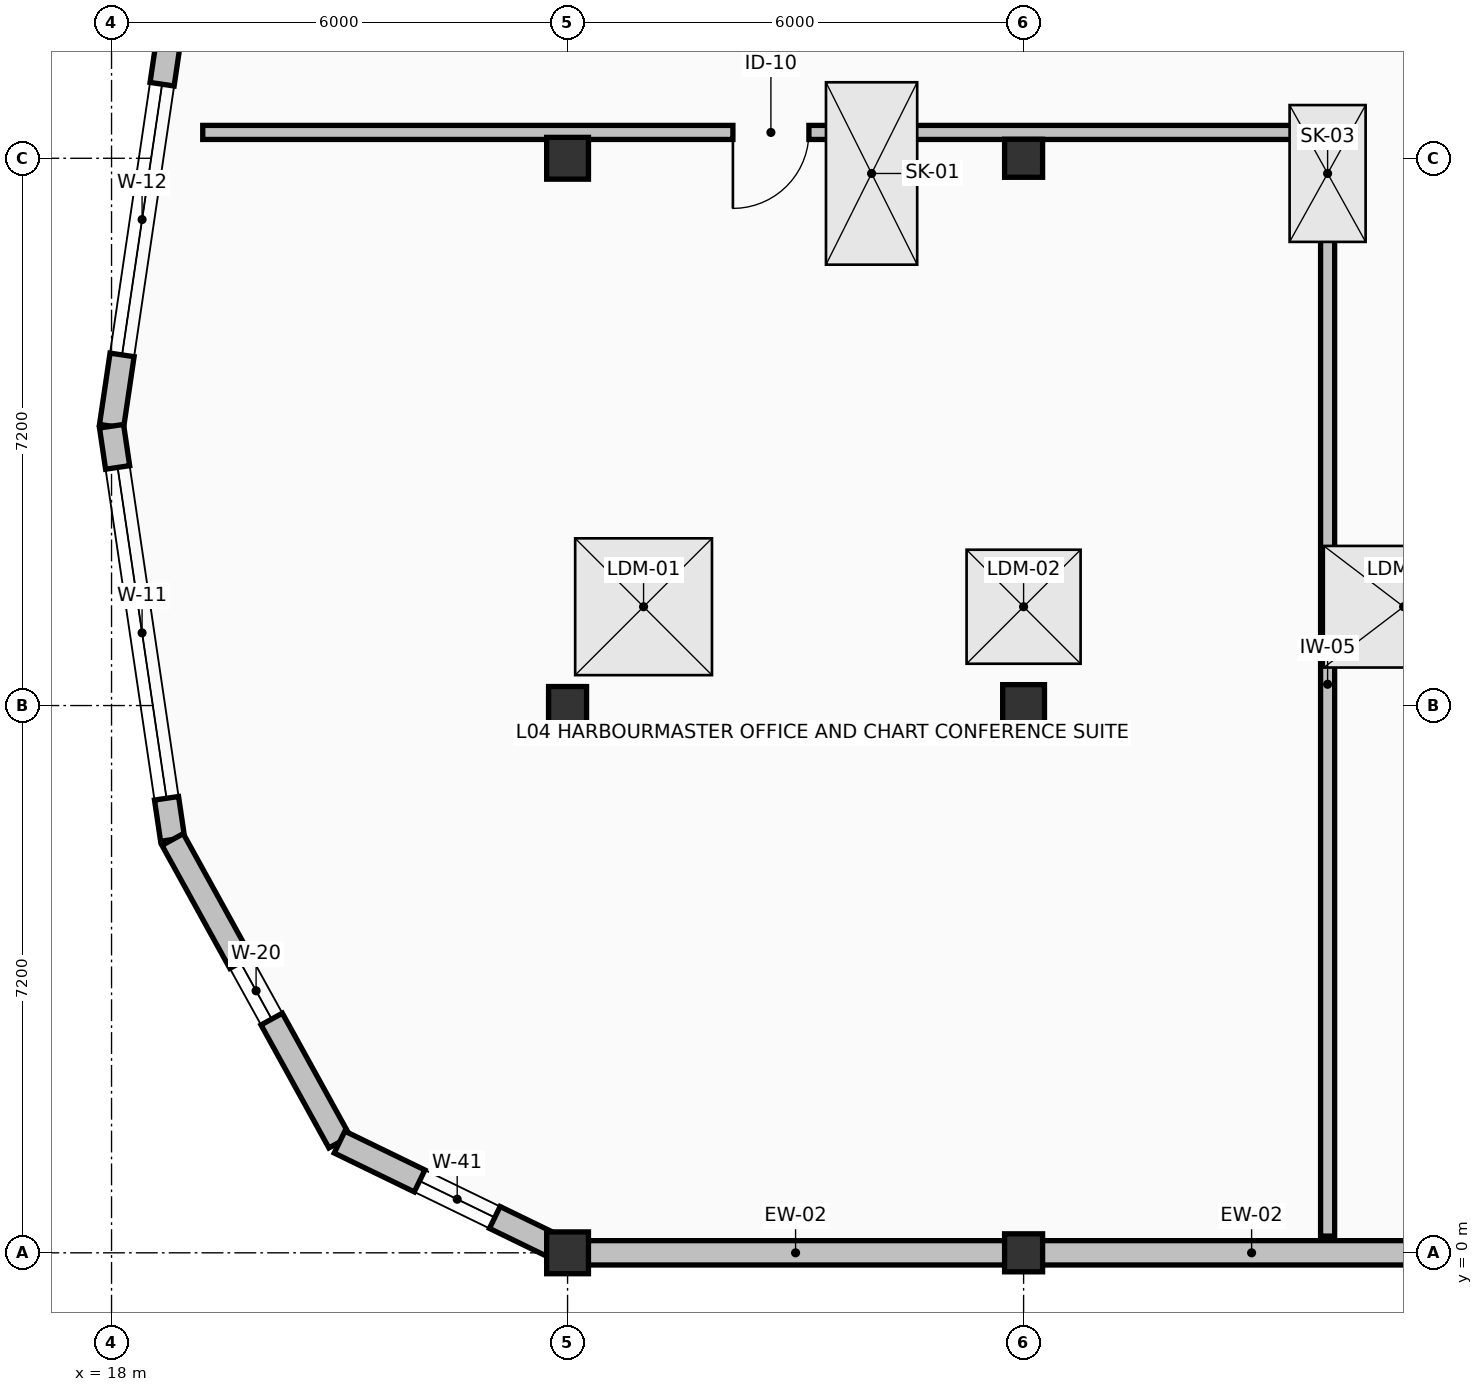
"""IFC4 building model, lengths in metres.
Left out: names, types, materials, properties, quantities, classifications, styles, units other than length and angle.
Written with IfcOpenShell. Run it as: python <this file> out.ifc"""

import sys

from ifc_helpers import new_model, si_unit, direction, frame, frame_2d, origin, origin_2d, place, context, subcontext, project, spatial, rectangle, extrude, element, fill, save


model = new_model("IFC4")
c1 = context("Model", 3, precision=1e-05, world=origin(), true_north=direction((0.0, 1.0)))
c2 = subcontext(c1, "Body", "Model", "MODEL_VIEW")
j1 = project(units=[si_unit("LENGTHUNIT", "METRE"), si_unit("PLANEANGLEUNIT", "RADIAN")], contexts=[c1])
p1 = place(None, origin())
s1 = spatial("IfcSite", under=j1, at=p1, CompositionType="ELEMENT")
p2 = place(p1, origin())
s2 = spatial("IfcBuilding", under=s1, at=p2, CompositionType="ELEMENT")
p3 = place(p2, frame((0.0, 0.0, 17.32)))
s3 = spatial("IfcBuildingStorey", under=s2, at=p3, CompositionType="ELEMENT", Elevation=17.32)
p4 = place(p3, frame((24.0, 0.0, 0.0), z_axis=(0.0, 0.0, 1.0), x_axis=(1.0, 0.0, 0.0)))
e1 = element("IfcColumn", 1, at=p4, inside=s3, PredefinedType="COLUMN", context=c2, shape_type="SweptSolid", body=[
    extrude(rectangle(XDim=0.55, YDim=0.55, at=origin_2d()), origin(), (0.0, 0.0, 1.0), 3.74),
])
p5 = place(p3, frame((24.0, 7.2, 0.0), z_axis=(0.0, 0.0, 1.0), x_axis=(1.0, 0.0, 0.0)))
e2 = element("IfcColumn", 2, at=p5, inside=s3, PredefinedType="COLUMN", context=c2, shape_type="SweptSolid", body=[
    extrude(rectangle(XDim=0.5, YDim=0.5, at=origin_2d()), origin(), (0.0, 0.0, 1.0), 3.74),
])
p6 = place(p3, frame((24.0, 14.4, 0.0), z_axis=(0.0, 0.0, 1.0), x_axis=(1.0, 0.0, 0.0)))
e3 = element("IfcColumn", 3, at=p6, inside=s3, PredefinedType="COLUMN", context=c2, shape_type="SweptSolid", body=[
    extrude(rectangle(XDim=0.55, YDim=0.55, at=origin_2d()), origin(), (0.0, 0.0, 1.0), 3.74),
])
p7 = place(p3, frame((30.0, 0.0, 0.0), z_axis=(0.0, 0.0, 1.0), x_axis=(1.0, 0.0, 0.0)))
e4 = element("IfcColumn", 4, at=p7, inside=s3, PredefinedType="COLUMN", context=c2, shape_type="SweptSolid", body=[
    extrude(rectangle(XDim=0.5, YDim=0.5, at=origin_2d()), origin(), (0.0, 0.0, 1.0), 3.74),
])
p8 = place(p3, frame((30.0, 7.2, 0.0), z_axis=(0.0, 0.0, 1.0), x_axis=(1.0, 0.0, 0.0)))
e5 = element("IfcColumn", 5, at=p8, inside=s3, PredefinedType="COLUMN", context=c2, shape_type="SweptSolid", body=[
    extrude(rectangle(XDim=0.55, YDim=0.55, at=origin_2d()), origin(), (0.0, 0.0, 1.0), 3.74),
])
p9 = place(p3, frame((30.0, 14.4, 0.0), z_axis=(0.0, 0.0, 1.0), x_axis=(1.0, 0.0, 0.0)))
e6 = element("IfcColumn", 6, at=p9, inside=s3, PredefinedType="COLUMN", context=c2, shape_type="SweptSolid", body=[
    extrude(rectangle(XDim=0.5, YDim=0.5, at=origin_2d()), origin(), (0.0, 0.0, 1.0), 3.74),
])
p10 = place(p3, frame((24.0, 0.0, 0.0), z_axis=(0.0, 0.0, 1.0), x_axis=(1.0, 0.0, 0.0)))
e7 = element("IfcWall", 7, at=p10, inside=s3, PredefinedType="SOLIDWALL", context=c2, shape_type="SweptSolid", body=[
    extrude(rectangle(XDim=6.0, YDim=0.32, at=frame_2d((3.0, 0.0))), origin(), (0.0, 0.0, 1.0), 2.8),
])
p11 = place(p3, frame((30.0, 0.0, 0.0), z_axis=(0.0, 0.0, 1.0), x_axis=(1.0, 0.0, 0.0)))
e8 = element("IfcWall", 8, at=p11, inside=s3, PredefinedType="SOLIDWALL", context=c2, shape_type="SweptSolid", body=[
    extrude(rectangle(XDim=6.0, YDim=0.32, at=frame_2d((3.0, 0.0))), origin(), (0.0, 0.0, 1.0), 2.85),
])
p12 = place(p3, frame((18.804, 16.312, 0.0), z_axis=(0.0, 0.0, 1.0), x_axis=(-0.146220266432, -0.98925205771, 0.0)))
e9 = element("IfcWall", 9, at=p12, inside=s3, PredefinedType="SOLIDWALL", context=c2, shape_type="SweptSolid", body=[
    extrude(rectangle(XDim=5.497, YDim=0.32, at=frame_2d((2.748, 0.0))), origin(), (0.0, 0.0, 1.0), 3.42),
])
p13 = place(p12, frame((0.948, 0.0, 0.9)))
e10 = element("IfcOpeningElement", 10, at=p13, cuts=e9, PredefinedType="OPENING", context=c2, shape_type="SweptSolid", body=[
    extrude(rectangle(XDim=3.6, YDim=1.85, at=frame_2d((1.8, 0.925))), frame((0.0, 0.17, 0.0), z_axis=(0.0, -1.0, 0.0), x_axis=(1.0, 0.0, 0.0)), (0.0, 0.0, 1.0), 0.34),
])
p14 = place(p3, frame((18.0, 10.875, 0.0), z_axis=(0.0, 0.0, 1.0), x_axis=(0.146220266432, -0.98925205771, 0.0)))
e11 = element("IfcWall", 11, at=p14, inside=s3, PredefinedType="SOLIDWALL", context=c2, shape_type="SweptSolid", body=[
    extrude(rectangle(XDim=5.497, YDim=0.32, at=frame_2d((2.748, 0.0))), origin(), (0.0, 0.0, 1.0), 3.42),
])
p15 = place(p14, frame((0.548, 0.0, 0.9)))
e12 = element("IfcOpeningElement", 12, at=p15, cuts=e11, PredefinedType="OPENING", context=c2, shape_type="SweptSolid", body=[
    extrude(rectangle(XDim=4.4, YDim=1.85, at=frame_2d((2.2, 0.925))), frame((0.0, 0.17, 0.0), z_axis=(0.0, -1.0, 0.0), x_axis=(1.0, 0.0, 0.0)), (0.0, 0.0, 1.0), 0.34),
])
p16 = place(p3, frame((18.804, 5.438, 0.0), z_axis=(0.0, 0.0, 1.0), x_axis=(0.483105735842, -0.875562018361, 0.0)))
e13 = element("IfcWall", 13, at=p16, inside=s3, PredefinedType="SOLIDWALL", context=c2, shape_type="SweptSolid", body=[
    extrude(rectangle(XDim=4.546, YDim=0.32, at=frame_2d((2.273, 0.0))), origin(), (0.0, 0.0, 1.0), 3.42),
])
p17 = place(p16, frame((1.848, 0.0, 1.15)))
e14 = element("IfcOpeningElement", 14, at=p17, cuts=e13, PredefinedType="OPENING", context=c2, shape_type="SweptSolid", body=[
    extrude(rectangle(XDim=0.85, YDim=0.85, at=frame_2d((0.425, 0.425))), frame((0.0, 0.17, 0.0), z_axis=(0.0, -1.0, 0.0), x_axis=(1.0, 0.0, 0.0)), (0.0, 0.0, 1.0), 0.34),
])
p18 = place(p3, frame((21.0, 1.457, 0.0), z_axis=(0.0, 0.0, 1.0), x_axis=(0.899521309608, -0.436876886046, 0.0)))
e15 = element("IfcWall", 15, at=p18, inside=s3, PredefinedType="SOLIDWALL", context=c2, shape_type="SweptSolid", body=[
    extrude(rectangle(XDim=3.335, YDim=0.32, at=frame_2d((1.667, 0.0))), origin(), (0.0, 0.0, 1.0), 3.42),
])
p19 = place(p18, frame((1.171, 0.0, 1.15)))
e16 = element("IfcOpeningElement", 16, at=p19, cuts=e15, PredefinedType="OPENING", context=c2, shape_type="SweptSolid", body=[
    extrude(rectangle(XDim=1.1, YDim=1.1, at=frame_2d((0.55, 0.55))), frame((0.0, 0.17, 0.0), z_axis=(0.0, -1.0, 0.0), x_axis=(1.0, 0.0, 0.0)), (0.0, 0.0, 1.0), 0.34),
])
p20 = place(p3, frame((34.0, 0.22, 0.0), z_axis=(0.0, 0.0, 1.0), x_axis=(0.0, 1.0, 0.0)))
e17 = element("IfcWall", 17, at=p20, inside=s3, PredefinedType="PARTITIONING", context=c2, shape_type="SweptSolid", body=[
    extrude(rectangle(XDim=14.52, YDim=0.185, at=frame_2d((7.26, 0.0))), origin(), (0.0, 0.0, 1.0), 3.13),
])
p21 = place(p3, frame((34.0, 14.74, 0.0), z_axis=(0.0, 0.0, 1.0), x_axis=(-1.0, 0.0, 0.0)))
e18 = element("IfcWall", 18, at=p21, inside=s3, PredefinedType="PARTITIONING", context=c2, shape_type="SweptSolid", body=[
    extrude(rectangle(XDim=14.8, YDim=0.185, at=frame_2d((7.4, 0.0))), origin(), (0.0, 0.0, 1.0), 2.65),
])
p22 = place(p21, frame((6.825, 0.0, 0.0)))
e19 = element("IfcOpeningElement", 19, at=p22, cuts=e18, PredefinedType="OPENING", context=c2, shape_type="SweptSolid", body=[
    extrude(rectangle(XDim=1.0, YDim=2.12, at=frame_2d((0.5, 1.06))), frame((0.0, 0.103, 0.0), z_axis=(0.0, -1.0, 0.0), x_axis=(1.0, 0.0, 0.0)), (0.0, 0.0, 1.0), 0.205),
])
p23 = place(p13, origin())
e20 = element("IfcWindow", 20, at=p23, inside=s3, PartitioningType="SINGLE_PANEL", PredefinedType="WINDOW", context=c2, shape_type="SweptSolid", body=[
    extrude(rectangle(XDim=3.6, YDim=1.85, at=frame_2d((1.8, 0.925))), frame((0.0, 0.03, 0.0), z_axis=(0.0, -1.0, 0.0), x_axis=(1.0, 0.0, 0.0)), (0.0, 0.0, 1.0), 0.06),
])
fill(e10, e20)
p24 = place(p15, origin())
e21 = element("IfcWindow", 21, at=p24, inside=s3, PartitioningType="SINGLE_PANEL", PredefinedType="WINDOW", context=c2, shape_type="SweptSolid", body=[
    extrude(rectangle(XDim=4.4, YDim=1.85, at=frame_2d((2.2, 0.925))), frame((0.0, 0.03, 0.0), z_axis=(0.0, -1.0, 0.0), x_axis=(1.0, 0.0, 0.0)), (0.0, 0.0, 1.0), 0.06),
])
fill(e12, e21)
p25 = place(p17, origin())
e22 = element("IfcWindow", 22, at=p25, inside=s3, PartitioningType="SINGLE_PANEL", PredefinedType="WINDOW", context=c2, shape_type="SweptSolid", body=[
    extrude(rectangle(XDim=0.85, YDim=0.85, at=frame_2d((0.425, 0.425))), frame((0.0, 0.03, 0.0), z_axis=(0.0, -1.0, 0.0), x_axis=(1.0, 0.0, 0.0)), (0.0, 0.0, 1.0), 0.06),
])
fill(e14, e22)
p26 = place(p19, origin())
e23 = element("IfcWindow", 23, at=p26, inside=s3, PartitioningType="SINGLE_PANEL", PredefinedType="WINDOW", context=c2, shape_type="SweptSolid", body=[
    extrude(rectangle(XDim=1.1, YDim=1.1, at=frame_2d((0.55, 0.55))), frame((0.0, 0.03, 0.0), z_axis=(0.0, -1.0, 0.0), x_axis=(1.0, 0.0, 0.0)), (0.0, 0.0, 1.0), 0.06),
])
fill(e16, e23)
p27 = place(p2, frame((0.0, 0.0, 21.06)))
p28 = place(p27, frame((0.0, 0.0, -0.28)))
p29 = place(p28, frame((28.0, 14.2, 0.0)))
p30 = place(p29, frame((0.0, 0.0, 0.23)))
e24 = element("IfcWindow", 24, at=p30, inside=s3, PartitioningType="SINGLE_PANEL", PredefinedType="SKYLIGHT", context=c2, shape_type="SweptSolid", body=[
    extrude(rectangle(XDim=1.2, YDim=2.4, at=origin_2d()), origin(), (0.0, 0.0, 1.0), 0.05),
])
p31 = place(p28, frame((34.0, 14.2, 0.0)))
p32 = place(p31, frame((0.0, 0.0, 0.23)))
e25 = element("IfcWindow", 25, at=p32, inside=s3, PartitioningType="SINGLE_PANEL", PredefinedType="SKYLIGHT", context=c2, shape_type="SweptSolid", body=[
    extrude(rectangle(XDim=1.0, YDim=1.8, at=origin_2d()), origin(), (0.0, 0.0, 1.0), 0.05),
])
p33 = place(p28, frame((25.0, 8.5, 0.0)))
p34 = place(p33, frame((0.0, 0.0, 0.23)))
e26 = element("IfcWindow", 26, at=p34, inside=s3, PartitioningType="SINGLE_PANEL", PredefinedType="LIGHTDOME", context=c2, shape_type="SweptSolid", body=[
    extrude(rectangle(XDim=1.8, YDim=1.8, at=origin_2d()), origin(), (0.0, 0.0, 1.0), 0.05),
])
p35 = place(p28, frame((30.0, 8.5, 0.0)))
p36 = place(p35, frame((0.0, 0.0, 0.23)))
e27 = element("IfcWindow", 27, at=p36, inside=s3, PartitioningType="SINGLE_PANEL", PredefinedType="LIGHTDOME", context=c2, shape_type="SweptSolid", body=[
    extrude(rectangle(XDim=1.5, YDim=1.5, at=origin_2d()), origin(), (0.0, 0.0, 1.0), 0.05),
])
p37 = place(p28, frame((35.0, 8.5, 0.0)))
p38 = place(p37, frame((0.0, 0.0, 0.23)))
e28 = element("IfcWindow", 28, at=p38, inside=s3, PartitioningType="SINGLE_PANEL", PredefinedType="LIGHTDOME", context=c2, shape_type="SweptSolid", body=[
    extrude(rectangle(XDim=2.1, YDim=1.6, at=origin_2d()), origin(), (0.0, 0.0, 1.0), 0.05),
])
p39 = place(p22, origin())
e29 = element("IfcDoor", 29, at=p39, inside=s3, OperationType="SINGLE_SWING_RIGHT", PredefinedType="DOOR", context=c2, shape_type="SweptSolid", body=[
    extrude(rectangle(XDim=1.0, YDim=2.12, at=frame_2d((0.5, 1.06))), frame((0.0, 0.025, 0.0), z_axis=(0.0, -1.0, 0.0), x_axis=(1.0, 0.0, 0.0)), (0.0, 0.0, 1.0), 0.05),
])
fill(e19, e29)
save(model, sys.argv[1])
